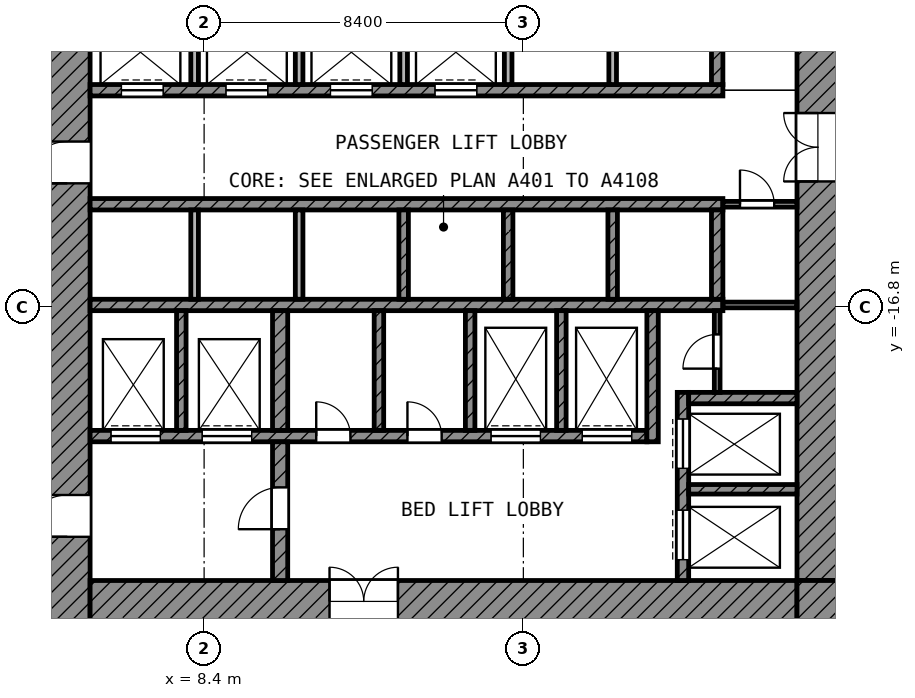
"""IFC4 building model, lengths in metres.
Left out: names, types, materials, properties, quantities, classifications, styles, units other than length and angle.
Written with IfcOpenShell. Run it as: python <this file> out.ifc"""

import sys

from ifc_helpers import new_model, si_unit, direction, frame, frame_2d, origin, place, context, subcontext, project, spatial, rectangle, extrude, element, fill, save


model = new_model("IFC4")
c1 = context("Model", 3, precision=1e-05, world=origin(), true_north=direction((0.0, 1.0)))
c2 = subcontext(c1, "Body", "Model", "MODEL_VIEW")
j1 = project(units=[si_unit("LENGTHUNIT", "METRE"), si_unit("PLANEANGLEUNIT", "RADIAN")], contexts=[c1])
p1 = place(None, origin())
s1 = spatial("IfcSite", under=j1, at=p1, CompositionType="ELEMENT")
p2 = place(p1, origin())
s2 = spatial("IfcBuilding", under=s1, at=p2, CompositionType="ELEMENT")
p3 = place(p2, frame((0.0, 0.0, 68.6)))
s3 = spatial("IfcBuildingStorey", under=s2, at=p3, CompositionType="ELEMENT", Elevation=68.6)
p4 = place(p3, frame((4.8, -25.1, 0.0), z_axis=(0.0, 0.0, 1.0), x_axis=(0.0, 1.0, 0.0)))
e1 = element("IfcWall", 1, at=p4, inside=s3, PredefinedType="SHEAR", context=c2, shape_type="SweptSolid", body=[
    extrude(rectangle(XDim=19.7, YDim=1.2, at=frame_2d((9.85, 0.0))), origin(), (0.0, 0.0, 1.0), 3.9),
])
p5 = place(p4, frame((11.55, 0.0, 0.0)))
e2 = element("IfcOpeningElement", 2, at=p5, cuts=e1, PredefinedType="OPENING", context=c2, shape_type="SweptSolid", body=[
    extrude(rectangle(XDim=1.1, YDim=2.1, at=frame_2d((0.55, 1.05))), frame((0.0, 0.61, 0.0), z_axis=(0.0, -1.0, 0.0), x_axis=(1.0, 0.0, 0.0)), (0.0, 0.0, 1.0), 1.22),
])
p6 = place(p4, frame((2.25, 0.0, 0.0)))
e3 = element("IfcOpeningElement", 3, at=p6, cuts=e1, PredefinedType="OPENING", context=c2, shape_type="SweptSolid", body=[
    extrude(rectangle(XDim=1.1, YDim=2.1, at=frame_2d((0.55, 1.05))), frame((0.0, 0.61, 0.0), z_axis=(0.0, -1.0, 0.0), x_axis=(1.0, 0.0, 0.0)), (0.0, 0.0, 1.0), 1.22),
])
p7 = place(p3, frame((24.55, -24.0, 0.0), z_axis=(0.0, 0.0, 1.0), x_axis=(0.0, 1.0, 0.0)))
e4 = element("IfcWall", 4, at=p7, inside=s3, PredefinedType="SHEAR", context=c2, shape_type="SweptSolid", body=[
    extrude(rectangle(XDim=18.6, YDim=1.1, at=frame_2d((9.3, 0.0))), origin(), (0.0, 0.0, 1.0), 3.9),
])
p8 = place(p7, frame((10.5, 0.0, 0.0)))
e5 = element("IfcOpeningElement", 5, at=p8, cuts=e4, PredefinedType="OPENING", context=c2, shape_type="SweptSolid", body=[
    extrude(rectangle(XDim=1.8, YDim=2.1, at=frame_2d((0.9, 1.05))), frame((0.0, 0.56, 0.0), z_axis=(0.0, -1.0, 0.0), x_axis=(1.0, 0.0, 0.0)), (0.0, 0.0, 1.0), 1.12),
])
p9 = place(p3, frame((5.4, -24.55, 0.0), z_axis=(0.0, 0.0, 1.0), x_axis=(1.0, 0.0, 0.0)))
e6 = element("IfcWall", 6, at=p9, inside=s3, PredefinedType="SHEAR", context=c2, shape_type="SweptSolid", body=[
    extrude(rectangle(XDim=18.6, YDim=1.1, at=frame_2d((9.3, 0.0))), origin(), (0.0, 0.0, 1.0), 3.9),
])
p10 = place(p9, frame((6.3, 0.0, 0.0)))
e7 = element("IfcOpeningElement", 7, at=p10, cuts=e6, PredefinedType="OPENING", context=c2, shape_type="SweptSolid", body=[
    extrude(rectangle(XDim=1.8, YDim=2.1, at=frame_2d((0.9, 1.05))), frame((0.0, 0.56, 0.0), z_axis=(0.0, -1.0, 0.0), x_axis=(1.0, 0.0, 0.0)), (0.0, 0.0, 1.0), 1.12),
])
p11 = place(p3, frame((24.55, -25.1, 0.0), z_axis=(0.0, 0.0, 1.0), x_axis=(0.0, 1.0, 0.0)))
e8 = element("IfcWall", 8, at=p11, inside=s3, PredefinedType="SHEAR", context=c2, shape_type="SweptSolid", body=[
    extrude(rectangle(XDim=1.1, YDim=1.1, at=frame_2d((0.55, 0.0))), origin(), (0.0, 0.0, 1.0), 3.9),
])
p12 = place(p3, frame((5.4, -11.1, 0.0), z_axis=(0.0, 0.0, 1.0), x_axis=(1.0, 0.0, 0.0)))
e9 = element("IfcWall", 9, at=p12, inside=s3, PredefinedType="SHEAR", context=c2, shape_type="SweptSolid", body=[
    extrude(rectangle(XDim=16.65, YDim=0.3, at=frame_2d((8.325, 0.0))), origin(), (0.0, 0.0, 1.0), 3.9),
])
p13 = place(p12, frame((0.825, 0.0, 0.0)))
e10 = element("IfcOpeningElement", 10, at=p13, cuts=e9, PredefinedType="OPENING", context=c2, shape_type="SweptSolid", body=[
    extrude(rectangle(XDim=1.1, YDim=2.1, at=frame_2d((0.55, 1.05))), frame((0.0, 0.16, 0.0), z_axis=(0.0, -1.0, 0.0), x_axis=(1.0, 0.0, 0.0)), (0.0, 0.0, 1.0), 0.32),
])
p14 = place(p12, frame((3.575, 0.0, 0.0)))
e11 = element("IfcOpeningElement", 11, at=p14, cuts=e9, PredefinedType="OPENING", context=c2, shape_type="SweptSolid", body=[
    extrude(rectangle(XDim=1.1, YDim=2.1, at=frame_2d((0.55, 1.05))), frame((0.0, 0.16, 0.0), z_axis=(0.0, -1.0, 0.0), x_axis=(1.0, 0.0, 0.0)), (0.0, 0.0, 1.0), 0.32),
])
p15 = place(p12, frame((6.325, 0.0, 0.0)))
e12 = element("IfcOpeningElement", 12, at=p15, cuts=e9, PredefinedType="OPENING", context=c2, shape_type="SweptSolid", body=[
    extrude(rectangle(XDim=1.1, YDim=2.1, at=frame_2d((0.55, 1.05))), frame((0.0, 0.16, 0.0), z_axis=(0.0, -1.0, 0.0), x_axis=(1.0, 0.0, 0.0)), (0.0, 0.0, 1.0), 0.32),
])
p16 = place(p12, frame((9.075, 0.0, 0.0)))
e13 = element("IfcOpeningElement", 13, at=p16, cuts=e9, PredefinedType="OPENING", context=c2, shape_type="SweptSolid", body=[
    extrude(rectangle(XDim=1.1, YDim=2.1, at=frame_2d((0.55, 1.05))), frame((0.0, 0.16, 0.0), z_axis=(0.0, -1.0, 0.0), x_axis=(1.0, 0.0, 0.0)), (0.0, 0.0, 1.0), 0.32),
])
for number, where, z_axis, x_axis in (
    (14, (5.4, -14.1, 0.0), (0.0, 0.0, 1.0), (1.0, 0.0, 0.0)),
    (15, (5.4, -16.75, 0.0), (0.0, 0.0, 1.0), (1.0, 0.0, 0.0)),
):
    element("IfcWall", number, at=place(p3, frame(where, z_axis=z_axis, x_axis=x_axis)), inside=s3, PredefinedType="SHEAR", context=c2, shape_type="SweptSolid", body=[
        extrude(rectangle(XDim=16.65, YDim=0.3, at=frame_2d((8.325, 0.0))), origin(), (0.0, 0.0, 1.0), 3.9),
    ])
p17 = place(p3, frame((5.4, -20.2, 0.0), z_axis=(0.0, 0.0, 1.0), x_axis=(1.0, 0.0, 0.0)))
e16 = element("IfcWall", 16, at=p17, inside=s3, PredefinedType="SHEAR", context=c2, shape_type="SweptSolid", body=[
    extrude(rectangle(XDim=14.65, YDim=0.3, at=frame_2d((7.325, 0.0))), origin(), (0.0, 0.0, 1.0), 3.9),
])
p18 = place(p17, frame((10.55, 0.0, 0.0)))
e17 = element("IfcOpeningElement", 17, at=p18, cuts=e16, PredefinedType="OPENING", context=c2, shape_type="SweptSolid", body=[
    extrude(rectangle(XDim=1.3, YDim=2.1, at=frame_2d((0.65, 1.05))), frame((0.0, 0.16, 0.0), z_axis=(0.0, -1.0, 0.0), x_axis=(1.0, 0.0, 0.0)), (0.0, 0.0, 1.0), 0.32),
])
p19 = place(p17, frame((12.95, 0.0, 0.0)))
e18 = element("IfcOpeningElement", 18, at=p19, cuts=e16, PredefinedType="OPENING", context=c2, shape_type="SweptSolid", body=[
    extrude(rectangle(XDim=1.3, YDim=2.1, at=frame_2d((0.65, 1.05))), frame((0.0, 0.16, 0.0), z_axis=(0.0, -1.0, 0.0), x_axis=(1.0, 0.0, 0.0)), (0.0, 0.0, 1.0), 0.32),
])
p20 = place(p17, frame((0.55, 0.0, 0.0)))
e19 = element("IfcOpeningElement", 19, at=p20, cuts=e16, PredefinedType="OPENING", context=c2, shape_type="SweptSolid", body=[
    extrude(rectangle(XDim=1.3, YDim=2.1, at=frame_2d((0.65, 1.05))), frame((0.0, 0.16, 0.0), z_axis=(0.0, -1.0, 0.0), x_axis=(1.0, 0.0, 0.0)), (0.0, 0.0, 1.0), 0.32),
])
p21 = place(p17, frame((2.95, 0.0, 0.0)))
e20 = element("IfcOpeningElement", 20, at=p21, cuts=e16, PredefinedType="OPENING", context=c2, shape_type="SweptSolid", body=[
    extrude(rectangle(XDim=1.3, YDim=2.1, at=frame_2d((0.65, 1.05))), frame((0.0, 0.16, 0.0), z_axis=(0.0, -1.0, 0.0), x_axis=(1.0, 0.0, 0.0)), (0.0, 0.0, 1.0), 0.32),
])
p22 = place(p17, frame((5.95, 0.0, 0.0)))
e21 = element("IfcOpeningElement", 21, at=p22, cuts=e16, PredefinedType="OPENING", context=c2, shape_type="SweptSolid", body=[
    extrude(rectangle(XDim=0.9, YDim=2.1, at=frame_2d((0.45, 1.05))), frame((0.0, 0.16, 0.0), z_axis=(0.0, -1.0, 0.0), x_axis=(1.0, 0.0, 0.0)), (0.0, 0.0, 1.0), 0.32),
])
p23 = place(p17, frame((8.35, 0.0, 0.0)))
e22 = element("IfcOpeningElement", 22, at=p23, cuts=e16, PredefinedType="OPENING", context=c2, shape_type="SweptSolid", body=[
    extrude(rectangle(XDim=0.9, YDim=2.1, at=frame_2d((0.45, 1.05))), frame((0.0, 0.16, 0.0), z_axis=(0.0, -1.0, 0.0), x_axis=(1.0, 0.0, 0.0)), (0.0, 0.0, 1.0), 0.32),
])
p24 = place(p3, frame((10.4, -24.0, 0.0), z_axis=(0.0, 0.0, 1.0), x_axis=(0.0, 1.0, 0.0)))
e23 = element("IfcWall", 23, at=p24, inside=s3, PredefinedType="SHEAR", context=c2, shape_type="SweptSolid", body=[
    extrude(rectangle(XDim=3.65, YDim=0.4, at=frame_2d((1.825, 0.0))), origin(), (0.0, 0.0, 1.0), 3.9),
])
p25 = place(p24, frame((1.35, 0.0, 0.0)))
e24 = element("IfcOpeningElement", 24, at=p25, cuts=e23, PredefinedType="OPENING", context=c2, shape_type="SweptSolid", body=[
    extrude(rectangle(XDim=1.1, YDim=2.1, at=frame_2d((0.55, 1.05))), frame((0.0, 0.21, 0.0), z_axis=(0.0, -1.0, 0.0), x_axis=(1.0, 0.0, 0.0)), (0.0, 0.0, 1.0), 0.42),
])
p26 = place(p3, frame((10.4, -20.05, 0.0), z_axis=(0.0, 0.0, 1.0), x_axis=(0.0, 1.0, 0.0)))
e25 = element("IfcWall", 25, at=p26, inside=s3, PredefinedType="SHEAR", context=c2, shape_type="SweptSolid", body=[
    extrude(rectangle(XDim=3.15, YDim=0.4, at=frame_2d((1.575, 0.0))), origin(), (0.0, 0.0, 1.0), 3.9),
])
p27 = place(p3, frame((20.2, -20.35, 0.0), z_axis=(0.0, 0.0, 1.0), x_axis=(0.0, 1.0, 0.0)))
e26 = element("IfcWall", 26, at=p27, inside=s3, PredefinedType="SHEAR", context=c2, shape_type="SweptSolid", body=[
    extrude(rectangle(XDim=3.45, YDim=0.3, at=frame_2d((1.725, 0.0))), origin(), (0.0, 0.0, 1.0), 3.9),
])
p28 = place(p3, frame((21.9, -10.95, 0.0), z_axis=(0.0, 0.0, 1.0), x_axis=(0.0, 1.0, 0.0)))
e27 = element("IfcWall", 27, at=p28, inside=s3, PredefinedType="SHEAR", context=c2, shape_type="SweptSolid", body=[
    extrude(rectangle(XDim=2.35, YDim=0.3, at=frame_2d((1.175, 0.0))), origin(), (0.0, 0.0, 1.0), 3.9),
])
p29 = place(p3, frame((21.9, -16.6, 0.0), z_axis=(0.0, 0.0, 1.0), x_axis=(0.0, 1.0, 0.0)))
e28 = element("IfcWall", 28, at=p29, inside=s3, PredefinedType="SHEAR", context=c2, shape_type="SweptSolid", body=[
    extrude(rectangle(XDim=2.35, YDim=0.3, at=frame_2d((1.175, 0.0))), origin(), (0.0, 0.0, 1.0), 3.9),
])
p30 = place(p3, frame((21.15, -19.2, 0.0), z_axis=(0.0, 0.0, 1.0), x_axis=(1.0, 0.0, 0.0)))
e29 = element("IfcWall", 29, at=p30, inside=s3, PredefinedType="SHEAR", context=c2, shape_type="SweptSolid", body=[
    extrude(rectangle(XDim=2.85, YDim=0.3, at=frame_2d((1.425, 0.0))), origin(), (0.0, 0.0, 1.0), 3.9),
])
p31 = place(p3, frame((21.0, -24.0, 0.0), z_axis=(0.0, 0.0, 1.0), x_axis=(0.0, 1.0, 0.0)))
e30 = element("IfcWall", 30, at=p31, inside=s3, PredefinedType="SHEAR", context=c2, shape_type="SweptSolid", body=[
    extrude(rectangle(XDim=4.95, YDim=0.3, at=frame_2d((2.475, 0.0))), origin(), (0.0, 0.0, 1.0), 3.9),
])
p32 = place(p31, frame((2.95, 0.0, 0.0)))
e31 = element("IfcOpeningElement", 31, at=p32, cuts=e30, PredefinedType="OPENING", context=c2, shape_type="SweptSolid", body=[
    extrude(rectangle(XDim=1.3, YDim=2.1, at=frame_2d((0.65, 1.05))), frame((0.0, 0.16, 0.0), z_axis=(0.0, -1.0, 0.0), x_axis=(1.0, 0.0, 0.0)), (0.0, 0.0, 1.0), 0.32),
])
p33 = place(p31, frame((0.55, 0.0, 0.0)))
e32 = element("IfcOpeningElement", 32, at=p33, cuts=e30, PredefinedType="OPENING", context=c2, shape_type="SweptSolid", body=[
    extrude(rectangle(XDim=1.3, YDim=2.1, at=frame_2d((0.65, 1.05))), frame((0.0, 0.16, 0.0), z_axis=(0.0, -1.0, 0.0), x_axis=(1.0, 0.0, 0.0)), (0.0, 0.0, 1.0), 0.32),
])
p34 = place(p3, frame((21.15, -21.6, 0.0), z_axis=(0.0, 0.0, 1.0), x_axis=(1.0, 0.0, 0.0)))
e33 = element("IfcWall", 33, at=p34, inside=s3, PredefinedType="SHEAR", context=c2, shape_type="SweptSolid", body=[
    extrude(rectangle(XDim=2.85, YDim=0.25, at=frame_2d((1.425, 0.0))), origin(), (0.0, 0.0, 1.0), 3.9),
])
for number, where, z_axis, x_axis in (
    (34, (7.8, -20.05, 0.0), (0.0, 0.0, 1.0), (0.0, 1.0, 0.0)),
    (35, (13.0, -20.05, 0.0), (0.0, 0.0, 1.0), (0.0, 1.0, 0.0)),
    (36, (15.4, -20.05, 0.0), (0.0, 0.0, 1.0), (0.0, 1.0, 0.0)),
    (37, (17.8, -20.05, 0.0), (0.0, 0.0, 1.0), (0.0, 1.0, 0.0)),
):
    element("IfcWall", number, at=place(p3, frame(where, z_axis=z_axis, x_axis=x_axis)), inside=s3, PredefinedType="SHEAR", context=c2, shape_type="SweptSolid", body=[
        extrude(rectangle(XDim=3.15, YDim=0.25, at=frame_2d((1.575, 0.0))), origin(), (0.0, 0.0, 1.0), 3.9),
    ])
for number, where, z_axis, x_axis in (
    (38, (8.15, -10.95, 0.0), (0.0, 0.0, 1.0), (0.0, 1.0, 0.0)),
    (39, (10.9, -10.95, 0.0), (0.0, 0.0, 1.0), (0.0, 1.0, 0.0)),
    (40, (13.65, -10.95, 0.0), (0.0, 0.0, 1.0), (0.0, 1.0, 0.0)),
    (41, (16.4, -10.95, 0.0), (0.0, 0.0, 1.0), (0.0, 1.0, 0.0)),
    (42, (19.15, -10.95, 0.0), (0.0, 0.0, 1.0), (0.0, 1.0, 0.0)),
):
    element("IfcWall", number, at=place(p3, frame(where, z_axis=z_axis, x_axis=x_axis)), inside=s3, PredefinedType="PARTITIONING", context=c2, shape_type="SweptSolid", body=[
        extrude(rectangle(XDim=2.35, YDim=0.2, at=frame_2d((1.175, 0.0))), origin(), (0.0, 0.0, 1.0), 3.9),
    ])
for number, where, z_axis, x_axis in (
    (43, (8.15, -16.6, 0.0), (0.0, 0.0, 1.0), (0.0, 1.0, 0.0)),
    (44, (10.9, -16.6, 0.0), (0.0, 0.0, 1.0), (0.0, 1.0, 0.0)),
):
    element("IfcWall", number, at=place(p3, frame(where, z_axis=z_axis, x_axis=x_axis)), inside=s3, PredefinedType="PARTITIONING", context=c2, shape_type="SweptSolid", body=[
        extrude(rectangle(XDim=2.35, YDim=0.2, at=frame_2d((1.175, 0.0))), origin(), (0.0, 0.0, 1.0), 3.9),
    ])
for number, where, z_axis, x_axis in (
    (45, (13.65, -16.6, 0.0), (0.0, 0.0, 1.0), (0.0, 1.0, 0.0)),
    (46, (16.4, -16.6, 0.0), (0.0, 0.0, 1.0), (0.0, 1.0, 0.0)),
    (47, (19.15, -16.6, 0.0), (0.0, 0.0, 1.0), (0.0, 1.0, 0.0)),
):
    element("IfcWall", number, at=place(p3, frame(where, z_axis=z_axis, x_axis=x_axis)), inside=s3, PredefinedType="SHEAR", context=c2, shape_type="SweptSolid", body=[
        extrude(rectangle(XDim=2.35, YDim=0.25, at=frame_2d((1.175, 0.0))), origin(), (0.0, 0.0, 1.0), 3.9),
    ])
p35 = place(p3, frame((21.9, -19.05, 0.0), z_axis=(0.0, 0.0, 1.0), x_axis=(0.0, 1.0, 0.0)))
e48 = element("IfcWall", 48, at=p35, inside=s3, PredefinedType="PARTITIONING", context=c2, shape_type="SweptSolid", body=[
    extrude(rectangle(XDim=2.15, YDim=0.15, at=frame_2d((1.075, 0.0))), origin(), (0.0, 0.0, 1.0), 3.9),
])
p36 = place(p35, frame((0.625, 0.0, 0.0)))
e49 = element("IfcOpeningElement", 49, at=p36, cuts=e48, PredefinedType="OPENING", context=c2, shape_type="SweptSolid", body=[
    extrude(rectangle(XDim=0.9, YDim=2.1, at=frame_2d((0.45, 1.05))), frame((0.0, 0.085, 0.0), z_axis=(0.0, -1.0, 0.0), x_axis=(1.0, 0.0, 0.0)), (0.0, 0.0, 1.0), 0.17),
])
p37 = place(p3, frame((22.05, -16.75, 0.0), z_axis=(0.0, 0.0, 1.0), x_axis=(1.0, 0.0, 0.0)))
e50 = element("IfcWall", 50, at=p37, inside=s3, PredefinedType="PARTITIONING", context=c2, shape_type="SweptSolid", body=[
    extrude(rectangle(XDim=1.95, YDim=0.15, at=frame_2d((0.975, 0.0))), origin(), (0.0, 0.0, 1.0), 3.9),
])
p38 = place(p3, frame((22.05, -14.1, 0.0), z_axis=(0.0, 0.0, 1.0), x_axis=(1.0, 0.0, 0.0)))
e51 = element("IfcWall", 51, at=p38, inside=s3, PredefinedType="PARTITIONING", context=c2, shape_type="SweptSolid", body=[
    extrude(rectangle(XDim=1.95, YDim=0.15, at=frame_2d((0.975, 0.0))), origin(), (0.0, 0.0, 1.0), 3.9),
])
p39 = place(p38, frame((0.45, 0.0, 0.0)))
e52 = element("IfcOpeningElement", 52, at=p39, cuts=e51, PredefinedType="OPENING", context=c2, shape_type="SweptSolid", body=[
    extrude(rectangle(XDim=0.9, YDim=2.1, at=frame_2d((0.45, 1.05))), frame((0.0, 0.085, 0.0), z_axis=(0.0, -1.0, 0.0), x_axis=(1.0, 0.0, 0.0)), (0.0, 0.0, 1.0), 0.17),
])
p40 = place(p13, origin())
e53 = element("IfcDoor", 53, at=p40, inside=s3, OperationType="DOUBLE_DOOR_SLIDING", PredefinedType="DOOR", context=c2, shape_type="SweptSolid", body=[
    extrude(rectangle(XDim=1.1, YDim=2.1, at=frame_2d((0.55, 1.05))), frame((0.0, 0.025, 0.0), z_axis=(0.0, -1.0, 0.0), x_axis=(1.0, 0.0, 0.0)), (0.0, 0.0, 1.0), 0.05),
])
fill(e10, e53)
p41 = place(p14, origin())
e54 = element("IfcDoor", 54, at=p41, inside=s3, OperationType="DOUBLE_DOOR_SLIDING", PredefinedType="DOOR", context=c2, shape_type="SweptSolid", body=[
    extrude(rectangle(XDim=1.1, YDim=2.1, at=frame_2d((0.55, 1.05))), frame((0.0, 0.025, 0.0), z_axis=(0.0, -1.0, 0.0), x_axis=(1.0, 0.0, 0.0)), (0.0, 0.0, 1.0), 0.05),
])
fill(e11, e54)
p42 = place(p15, origin())
e55 = element("IfcDoor", 55, at=p42, inside=s3, OperationType="DOUBLE_DOOR_SLIDING", PredefinedType="DOOR", context=c2, shape_type="SweptSolid", body=[
    extrude(rectangle(XDim=1.1, YDim=2.1, at=frame_2d((0.55, 1.05))), frame((0.0, 0.025, 0.0), z_axis=(0.0, -1.0, 0.0), x_axis=(1.0, 0.0, 0.0)), (0.0, 0.0, 1.0), 0.05),
])
fill(e12, e55)
p43 = place(p16, origin())
e56 = element("IfcDoor", 56, at=p43, inside=s3, OperationType="DOUBLE_DOOR_SLIDING", PredefinedType="DOOR", context=c2, shape_type="SweptSolid", body=[
    extrude(rectangle(XDim=1.1, YDim=2.1, at=frame_2d((0.55, 1.05))), frame((0.0, 0.025, 0.0), z_axis=(0.0, -1.0, 0.0), x_axis=(1.0, 0.0, 0.0)), (0.0, 0.0, 1.0), 0.05),
])
fill(e13, e56)
p44 = place(p32, origin())
e57 = element("IfcDoor", 57, at=p44, inside=s3, OperationType="DOUBLE_DOOR_SLIDING", PredefinedType="DOOR", context=c2, shape_type="SweptSolid", body=[
    extrude(rectangle(XDim=1.3, YDim=2.1, at=frame_2d((0.65, 1.05))), frame((0.0, 0.025, 0.0), z_axis=(0.0, -1.0, 0.0), x_axis=(1.0, 0.0, 0.0)), (0.0, 0.0, 1.0), 0.05),
])
fill(e31, e57)
p45 = place(p33, origin())
e58 = element("IfcDoor", 58, at=p45, inside=s3, OperationType="DOUBLE_DOOR_SLIDING", PredefinedType="DOOR", context=c2, shape_type="SweptSolid", body=[
    extrude(rectangle(XDim=1.3, YDim=2.1, at=frame_2d((0.65, 1.05))), frame((0.0, 0.025, 0.0), z_axis=(0.0, -1.0, 0.0), x_axis=(1.0, 0.0, 0.0)), (0.0, 0.0, 1.0), 0.05),
])
fill(e32, e58)
p46 = place(p18, origin())
e59 = element("IfcDoor", 59, at=p46, inside=s3, OperationType="DOUBLE_DOOR_SLIDING", PredefinedType="DOOR", context=c2, shape_type="SweptSolid", body=[
    extrude(rectangle(XDim=1.3, YDim=2.1, at=frame_2d((0.65, 1.05))), frame((0.0, 0.025, 0.0), z_axis=(0.0, -1.0, 0.0), x_axis=(1.0, 0.0, 0.0)), (0.0, 0.0, 1.0), 0.05),
])
fill(e17, e59)
p47 = place(p19, origin())
e60 = element("IfcDoor", 60, at=p47, inside=s3, OperationType="DOUBLE_DOOR_SLIDING", PredefinedType="DOOR", context=c2, shape_type="SweptSolid", body=[
    extrude(rectangle(XDim=1.3, YDim=2.1, at=frame_2d((0.65, 1.05))), frame((0.0, 0.025, 0.0), z_axis=(0.0, -1.0, 0.0), x_axis=(1.0, 0.0, 0.0)), (0.0, 0.0, 1.0), 0.05),
])
fill(e18, e60)
p48 = place(p20, origin())
e61 = element("IfcDoor", 61, at=p48, inside=s3, OperationType="DOUBLE_DOOR_SLIDING", PredefinedType="DOOR", context=c2, shape_type="SweptSolid", body=[
    extrude(rectangle(XDim=1.3, YDim=2.1, at=frame_2d((0.65, 1.05))), frame((0.0, 0.025, 0.0), z_axis=(0.0, -1.0, 0.0), x_axis=(1.0, 0.0, 0.0)), (0.0, 0.0, 1.0), 0.05),
])
fill(e19, e61)
p49 = place(p21, origin())
e62 = element("IfcDoor", 62, at=p49, inside=s3, OperationType="DOUBLE_DOOR_SLIDING", PredefinedType="DOOR", context=c2, shape_type="SweptSolid", body=[
    extrude(rectangle(XDim=1.3, YDim=2.1, at=frame_2d((0.65, 1.05))), frame((0.0, 0.025, 0.0), z_axis=(0.0, -1.0, 0.0), x_axis=(1.0, 0.0, 0.0)), (0.0, 0.0, 1.0), 0.05),
])
fill(e20, e62)
p50 = place(p5, origin())
e63 = element("IfcDoor", 63, at=p50, inside=s3, OperationType="SINGLE_SWING_LEFT", PredefinedType="DOOR", context=c2, shape_type="SweptSolid", body=[
    extrude(rectangle(XDim=1.1, YDim=2.1, at=frame_2d((0.55, 1.05))), frame((0.0, 0.025, 0.0), z_axis=(0.0, -1.0, 0.0), x_axis=(1.0, 0.0, 0.0)), (0.0, 0.0, 1.0), 0.05),
])
fill(e2, e63)
p51 = place(p6, origin())
e64 = element("IfcDoor", 64, at=p51, inside=s3, OperationType="SINGLE_SWING_LEFT", PredefinedType="DOOR", context=c2, shape_type="SweptSolid", body=[
    extrude(rectangle(XDim=1.1, YDim=2.1, at=frame_2d((0.55, 1.05))), frame((0.0, 0.025, 0.0), z_axis=(0.0, -1.0, 0.0), x_axis=(1.0, 0.0, 0.0)), (0.0, 0.0, 1.0), 0.05),
])
fill(e3, e64)
p52 = place(p25, origin())
e65 = element("IfcDoor", 65, at=p52, inside=s3, OperationType="SINGLE_SWING_LEFT", PredefinedType="DOOR", context=c2, shape_type="SweptSolid", body=[
    extrude(rectangle(XDim=1.1, YDim=2.1, at=frame_2d((0.55, 1.05))), frame((0.0, 0.025, 0.0), z_axis=(0.0, -1.0, 0.0), x_axis=(1.0, 0.0, 0.0)), (0.0, 0.0, 1.0), 0.05),
])
fill(e24, e65)
p53 = place(p8, origin())
e66 = element("IfcDoor", 66, at=p53, inside=s3, OperationType="DOUBLE_DOOR_SINGLE_SWING", PredefinedType="DOOR", context=c2, shape_type="SweptSolid", body=[
    extrude(rectangle(XDim=1.8, YDim=2.1, at=frame_2d((0.9, 1.05))), frame((0.0, 0.025, 0.0), z_axis=(0.0, -1.0, 0.0), x_axis=(1.0, 0.0, 0.0)), (0.0, 0.0, 1.0), 0.05),
])
fill(e5, e66)
p54 = place(p10, origin())
e67 = element("IfcDoor", 67, at=p54, inside=s3, OperationType="DOUBLE_DOOR_SINGLE_SWING", PredefinedType="DOOR", context=c2, shape_type="SweptSolid", body=[
    extrude(rectangle(XDim=1.8, YDim=2.1, at=frame_2d((0.9, 1.05))), frame((0.0, 0.025, 0.0), z_axis=(0.0, -1.0, 0.0), x_axis=(1.0, 0.0, 0.0)), (0.0, 0.0, 1.0), 0.05),
])
fill(e7, e67)
p55 = place(p39, origin())
e68 = element("IfcDoor", 68, at=p55, inside=s3, OperationType="SINGLE_SWING_LEFT", PredefinedType="DOOR", context=c2, shape_type="SweptSolid", body=[
    extrude(rectangle(XDim=0.9, YDim=2.1, at=frame_2d((0.45, 1.05))), frame((0.0, 0.025, 0.0), z_axis=(0.0, -1.0, 0.0), x_axis=(1.0, 0.0, 0.0)), (0.0, 0.0, 1.0), 0.05),
])
fill(e52, e68)
p56 = place(p36, origin())
e69 = element("IfcDoor", 69, at=p56, inside=s3, OperationType="SINGLE_SWING_LEFT", PredefinedType="DOOR", context=c2, shape_type="SweptSolid", body=[
    extrude(rectangle(XDim=0.9, YDim=2.1, at=frame_2d((0.45, 1.05))), frame((0.0, 0.025, 0.0), z_axis=(0.0, -1.0, 0.0), x_axis=(1.0, 0.0, 0.0)), (0.0, 0.0, 1.0), 0.05),
])
fill(e49, e69)
p57 = place(p22, origin())
e70 = element("IfcDoor", 70, at=p57, inside=s3, OperationType="SINGLE_SWING_LEFT", PredefinedType="DOOR", context=c2, shape_type="SweptSolid", body=[
    extrude(rectangle(XDim=0.9, YDim=2.1, at=frame_2d((0.45, 1.05))), frame((0.0, 0.025, 0.0), z_axis=(0.0, -1.0, 0.0), x_axis=(1.0, 0.0, 0.0)), (0.0, 0.0, 1.0), 0.05),
])
fill(e21, e70)
p58 = place(p23, origin())
e71 = element("IfcDoor", 71, at=p58, inside=s3, OperationType="SINGLE_SWING_LEFT", PredefinedType="DOOR", context=c2, shape_type="SweptSolid", body=[
    extrude(rectangle(XDim=0.9, YDim=2.1, at=frame_2d((0.45, 1.05))), frame((0.0, 0.025, 0.0), z_axis=(0.0, -1.0, 0.0), x_axis=(1.0, 0.0, 0.0)), (0.0, 0.0, 1.0), 0.05),
])
fill(e22, e71)
save(model, sys.argv[1])
